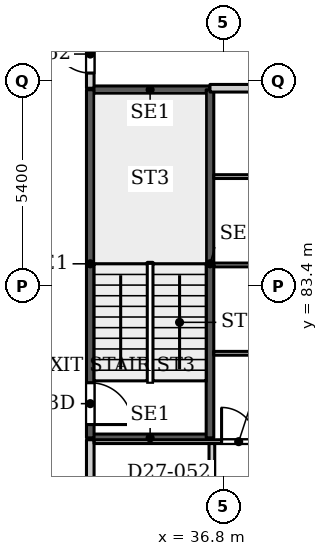
"""IFC4 building model, lengths in metres.
Left out: names, types, materials, properties, quantities, classifications, styles, units other than length and angle.
Written with IfcOpenShell. Run it as: python <this file> out.ifc"""

import sys

from ifc_helpers import new_model, si_unit, direction, frame, frame_2d, origin, place, context, subcontext, project, spatial, rectangle, extrude, source, transform, mapped, element, fill, save


model = new_model("IFC4")
c1 = context("Model", 3, precision=1e-05, world=origin(), true_north=direction((0.0, 1.0)))
c2 = subcontext(c1, "Body", "Model", "MODEL_VIEW")
j1 = project(units=[si_unit("LENGTHUNIT", "METRE"), si_unit("PLANEANGLEUNIT", "RADIAN")], contexts=[c1])
p1 = place(None, origin())
s1 = spatial("IfcSite", under=j1, at=p1, CompositionType="ELEMENT")
p2 = place(p1, origin())
s2 = spatial("IfcBuilding", under=s1, at=p2, CompositionType="ELEMENT")
p3 = place(p2, frame((0.0, 0.0, 117.5)))
s3 = spatial("IfcBuildingStorey", under=s2, at=p3, CompositionType="ELEMENT", Elevation=117.5)
for number, where, z_axis, x_axis in (
    (1, (33.3, 79.4, 0.0), (0.0, 0.0, 1.0), (1.0, 0.0, 0.0)),
    (2, (33.3, 88.56, 0.0), (0.0, 0.0, 1.0), (1.0, 0.0, 0.0)),
):
    element("IfcWall", number, at=place(p3, frame(where, z_axis=z_axis, x_axis=x_axis)), inside=s3, PredefinedType="SHEAR", context=c2, shape_type="SweptSolid", body=[
        extrude(rectangle(XDim=3.15, YDim=0.2, at=frame_2d((1.575, 0.0))), origin(), (0.0, 0.0, 1.0), 3.9),
    ])
p4 = place(p3, frame((33.3, 79.4, 0.0), z_axis=(0.0, 0.0, 1.0), x_axis=(0.0, 1.0, 0.0)))
e3 = element("IfcWall", 3, at=p4, inside=s3, PredefinedType="SHEAR", context=c2, shape_type="SweptSolid", body=[
    extrude(rectangle(XDim=9.16, YDim=0.2, at=frame_2d((4.58, 0.0))), origin(), (0.0, 0.0, 1.0), 3.9),
])
p5 = place(p4, frame((0.35, 0.0, 0.0)))
e4 = element("IfcOpeningElement", 4, at=p5, cuts=e3, PredefinedType="OPENING", context=c2, shape_type="SweptSolid", body=[
    extrude(rectangle(XDim=1.1, YDim=2.2, at=frame_2d((0.55, 1.1))), frame((0.0, 0.11, 0.0), z_axis=(0.0, -1.0, 0.0), x_axis=(1.0, 0.0, 0.0)), (0.0, 0.0, 1.0), 0.22),
])
p6 = place(p3, frame((36.45, 79.4, 0.0), z_axis=(0.0, 0.0, 1.0), x_axis=(0.0, 1.0, 0.0)))
e5 = element("IfcWall", 5, at=p6, inside=s3, PredefinedType="SHEAR", context=c2, shape_type="SweptSolid", body=[
    extrude(rectangle(XDim=9.16, YDim=0.2, at=frame_2d((4.58, 0.0))), origin(), (0.0, 0.0, 1.0), 3.9),
])
p7 = place(p3, frame((33.3, 54.4, 0.0), z_axis=(0.0, 0.0, 1.0), x_axis=(0.0, 1.0, 0.0)))
e6 = element("IfcWall", 6, at=p7, inside=s3, PredefinedType="PARTITIONING", context=c2, shape_type="SweptSolid", body=[
    extrude(rectangle(XDim=24.95, YDim=0.2, at=frame_2d((12.475, 0.0))), origin(), (0.0, 0.0, 1.0), 3.6),
])
p8 = place(p7, frame((3.1, 0.0, 0.0)))
e7 = element("IfcOpeningElement", 7, at=p8, cuts=e6, PredefinedType="OPENING", context=c2, shape_type="SweptSolid", body=[
    extrude(rectangle(XDim=1.0, YDim=2.1, at=frame_2d((0.5, 1.05))), frame((0.0, 0.11, 0.0), z_axis=(0.0, -1.0, 0.0), x_axis=(1.0, 0.0, 0.0)), (0.0, 0.0, 1.0), 0.22),
])
p9 = place(p7, frame((14.8, 0.0, 0.0)))
e8 = element("IfcOpeningElement", 8, at=p9, cuts=e6, PredefinedType="OPENING", context=c2, shape_type="SweptSolid", body=[
    extrude(rectangle(XDim=1.0, YDim=2.1, at=frame_2d((0.5, 1.05))), frame((0.0, 0.11, 0.0), z_axis=(0.0, -1.0, 0.0), x_axis=(1.0, 0.0, 0.0)), (0.0, 0.0, 1.0), 0.22),
])
p10 = place(p3, frame((33.3, 88.6, 0.0), z_axis=(0.0, 0.0, 1.0), x_axis=(0.0, 1.0, 0.0)))
e9 = element("IfcWall", 9, at=p10, inside=s3, PredefinedType="PARTITIONING", context=c2, shape_type="SweptSolid", body=[
    extrude(rectangle(XDim=5.175, YDim=0.2, at=frame_2d((2.587, 0.0))), origin(), (0.0, 0.0, 1.0), 3.6),
])
p11 = place(p10, frame((0.4, 0.0, 0.0)))
e10 = element("IfcOpeningElement", 10, at=p11, cuts=e9, PredefinedType="OPENING", context=c2, shape_type="SweptSolid", body=[
    extrude(rectangle(XDim=1.0, YDim=2.1, at=frame_2d((0.5, 1.05))), frame((0.0, 0.11, 0.0), z_axis=(0.0, -1.0, 0.0), x_axis=(1.0, 0.0, 0.0)), (0.0, 0.0, 1.0), 0.22),
])
p12 = place(p3, frame((33.4, 79.3, 0.0), z_axis=(0.0, 0.0, 1.0), x_axis=(1.0, 0.0, 0.0)))
e11 = element("IfcWall", 11, at=p12, inside=s3, PredefinedType="PARTITIONING", context=c2, shape_type="SweptSolid", body=[
    extrude(rectangle(XDim=12.5, YDim=0.1, at=frame_2d((6.25, 0.0))), origin(), (0.0, 0.0, 1.0), 3.6),
])
p13 = place(p12, frame((3.355, 0.0, 0.0)))
e12 = element("IfcOpeningElement", 12, at=p13, cuts=e11, PredefinedType="OPENING", context=c2, shape_type="SweptSolid", body=[
    extrude(rectangle(XDim=0.9, YDim=2.1, at=frame_2d((0.45, 1.05))), frame((0.0, 0.06, 0.0), z_axis=(0.0, -1.0, 0.0), x_axis=(1.0, 0.0, 0.0)), (0.0, 0.0, 1.0), 0.12),
])
p14 = place(p3, frame((36.5, 71.125, 0.0), z_axis=(0.0, 0.0, 1.0), x_axis=(0.0, 1.0, 0.0)))
e13 = element("IfcWall", 13, at=p14, inside=s3, PredefinedType="PARTITIONING", context=c2, shape_type="SweptSolid", body=[
    extrude(rectangle(XDim=8.125, YDim=0.15, at=frame_2d((4.062, 0.0))), origin(), (0.0, 0.0, 1.0), 3.6),
])
p15 = place(p14, frame((0.875, 0.0, 0.0)))
e14 = element("IfcOpeningElement", 14, at=p15, cuts=e13, PredefinedType="OPENING", context=c2, shape_type="SweptSolid", body=[
    extrude(rectangle(XDim=0.8, YDim=2.1, at=frame_2d((0.4, 1.05))), frame((0.0, 0.085, 0.0), z_axis=(0.0, -1.0, 0.0), x_axis=(1.0, 0.0, 0.0)), (0.0, 0.0, 1.0), 0.17),
])
p16 = place(p14, frame((5.775, 0.0, 0.0)))
e15 = element("IfcOpeningElement", 15, at=p16, cuts=e13, PredefinedType="OPENING", context=c2, shape_type="SweptSolid", body=[
    extrude(rectangle(XDim=0.9, YDim=2.1, at=frame_2d((0.45, 1.05))), frame((0.0, 0.085, 0.0), z_axis=(0.0, -1.0, 0.0), x_axis=(1.0, 0.0, 0.0)), (0.0, 0.0, 1.0), 0.17),
])
p17 = place(p14, frame((2.975, 0.0, 0.0)))
e16 = element("IfcOpeningElement", 16, at=p17, cuts=e13, PredefinedType="OPENING", context=c2, shape_type="SweptSolid", body=[
    extrude(rectangle(XDim=0.8, YDim=2.1, at=frame_2d((0.4, 1.05))), frame((0.0, 0.085, 0.0), z_axis=(0.0, -1.0, 0.0), x_axis=(1.0, 0.0, 0.0)), (0.0, 0.0, 1.0), 0.17),
])
p18 = place(p3, frame((36.45, 88.6, 0.0), z_axis=(0.0, 0.0, 1.0), x_axis=(1.0, 0.0, 0.0)))
e17 = element("IfcWall", 17, at=p18, inside=s3, PredefinedType="PARTITIONING", context=c2, shape_type="SweptSolid", body=[
    extrude(rectangle(XDim=9.45, YDim=0.2, at=frame_2d((4.725, 0.0))), origin(), (0.0, 0.0, 1.0), 2.5),
])
p19 = place(p3, frame((36.549, 81.625, 0.0), z_axis=(0.0, 0.0, 1.0), x_axis=(1.0, 0.0, 0.0)))
e18 = element("IfcWall", 18, at=p19, inside=s3, PredefinedType="PARTITIONING", context=c2, shape_type="SweptSolid", body=[
    extrude(rectangle(XDim=9.351, YDim=0.1, at=frame_2d((4.675, 0.0))), origin(), (0.0, 0.0, 1.0), 3.6),
])
p20 = place(p19, frame((4.176, 0.0, 0.0)))
e19 = element("IfcOpeningElement", 19, at=p20, cuts=e18, PredefinedType="OPENING", context=c2, shape_type="SweptSolid", body=[
    extrude(rectangle(XDim=0.9, YDim=2.1, at=frame_2d((0.45, 1.05))), frame((0.0, 0.06, 0.0), z_axis=(0.0, -1.0, 0.0), x_axis=(1.0, 0.0, 0.0)), (0.0, 0.0, 1.0), 0.12),
])
p21 = place(p3, frame((36.549, 83.95, 0.0), z_axis=(0.0, 0.0, 1.0), x_axis=(1.0, 0.0, 0.0)))
e20 = element("IfcWall", 20, at=p21, inside=s3, PredefinedType="PARTITIONING", context=c2, shape_type="SweptSolid", body=[
    extrude(rectangle(XDim=9.351, YDim=0.1, at=frame_2d((4.675, 0.0))), origin(), (0.0, 0.0, 1.0), 3.6),
])
p22 = place(p21, frame((4.176, 0.0, 0.0)))
e21 = element("IfcOpeningElement", 21, at=p22, cuts=e20, PredefinedType="OPENING", context=c2, shape_type="SweptSolid", body=[
    extrude(rectangle(XDim=0.9, YDim=2.1, at=frame_2d((0.45, 1.05))), frame((0.0, 0.06, 0.0), z_axis=(0.0, -1.0, 0.0), x_axis=(1.0, 0.0, 0.0)), (0.0, 0.0, 1.0), 0.12),
])
p23 = place(p3, frame((36.549, 86.275, 0.0), z_axis=(0.0, 0.0, 1.0), x_axis=(1.0, 0.0, 0.0)))
e22 = element("IfcWall", 22, at=p23, inside=s3, PredefinedType="PARTITIONING", context=c2, shape_type="SweptSolid", body=[
    extrude(rectangle(XDim=9.351, YDim=0.1, at=frame_2d((4.675, 0.0))), origin(), (0.0, 0.0, 1.0), 3.6),
])
p24 = place(p23, frame((4.176, 0.0, 0.0)))
e23 = element("IfcOpeningElement", 23, at=p24, cuts=e22, PredefinedType="OPENING", context=c2, shape_type="SweptSolid", body=[
    extrude(rectangle(XDim=0.9, YDim=2.1, at=frame_2d((0.45, 1.05))), frame((0.0, 0.06, 0.0), z_axis=(0.0, -1.0, 0.0), x_axis=(1.0, 0.0, 0.0)), (0.0, 0.0, 1.0), 0.12),
])
m1 = source(origin(), c2, "Body", "SweptSolid", [
    extrude(rectangle(XDim=1.1, YDim=2.2, at=frame_2d((0.55, 1.1))), frame((0.0, 0.025, 0.0), z_axis=(0.0, -1.0, 0.0), x_axis=(1.0, 0.0, 0.0)), (0.0, 0.0, 1.0), 0.05),
])
p25 = place(p5, origin())
e24 = element("IfcDoor", 24, at=p25, inside=s3, OperationType="SINGLE_SWING_RIGHT", PredefinedType="DOOR", context=c2, shape_type="MappedRepresentation", body=[
    mapped(m1, transform((0.0, 0.0, 0.0), x_axis=(1.0, 0.0, 0.0), y_axis=(0.0, 1.0, 0.0), z_axis=(0.0, 0.0, 1.0), scale=1.0)),
])
fill(e4, e24)
m2 = source(origin(), c2, "Body", "SweptSolid", [
    extrude(rectangle(XDim=0.9, YDim=2.1, at=frame_2d((0.45, 1.05))), frame((0.0, 0.025, 0.0), z_axis=(0.0, -1.0, 0.0), x_axis=(1.0, 0.0, 0.0)), (0.0, 0.0, 1.0), 0.05),
])
p26 = place(p13, origin())
e25 = element("IfcDoor", 25, at=p26, inside=s3, OperationType="SINGLE_SWING_LEFT", PredefinedType="DOOR", context=c2, shape_type="MappedRepresentation", body=[
    mapped(m2, transform((0.0, 0.0, 0.0), x_axis=(1.0, 0.0, 0.0), y_axis=(0.0, 1.0, 0.0), z_axis=(0.0, 0.0, 1.0), scale=1.0)),
])
fill(e12, e25)
m3 = source(origin(), c2, "Body", "SweptSolid", [
    extrude(rectangle(XDim=1.0, YDim=2.1, at=frame_2d((0.5, 1.05))), frame((0.0, 0.025, 0.0), z_axis=(0.0, -1.0, 0.0), x_axis=(1.0, 0.0, 0.0)), (0.0, 0.0, 1.0), 0.05),
])
p27 = place(p11, origin())
e26 = element("IfcDoor", 26, at=p27, inside=s3, OperationType="SINGLE_SWING_LEFT", PredefinedType="DOOR", context=c2, shape_type="MappedRepresentation", body=[
    mapped(m3, transform((0.0, 0.0, 0.0), x_axis=(1.0, 0.0, 0.0), y_axis=(0.0, 1.0, 0.0), z_axis=(0.0, 0.0, 1.0), scale=1.0)),
])
fill(e10, e26)
save(model, sys.argv[1])
